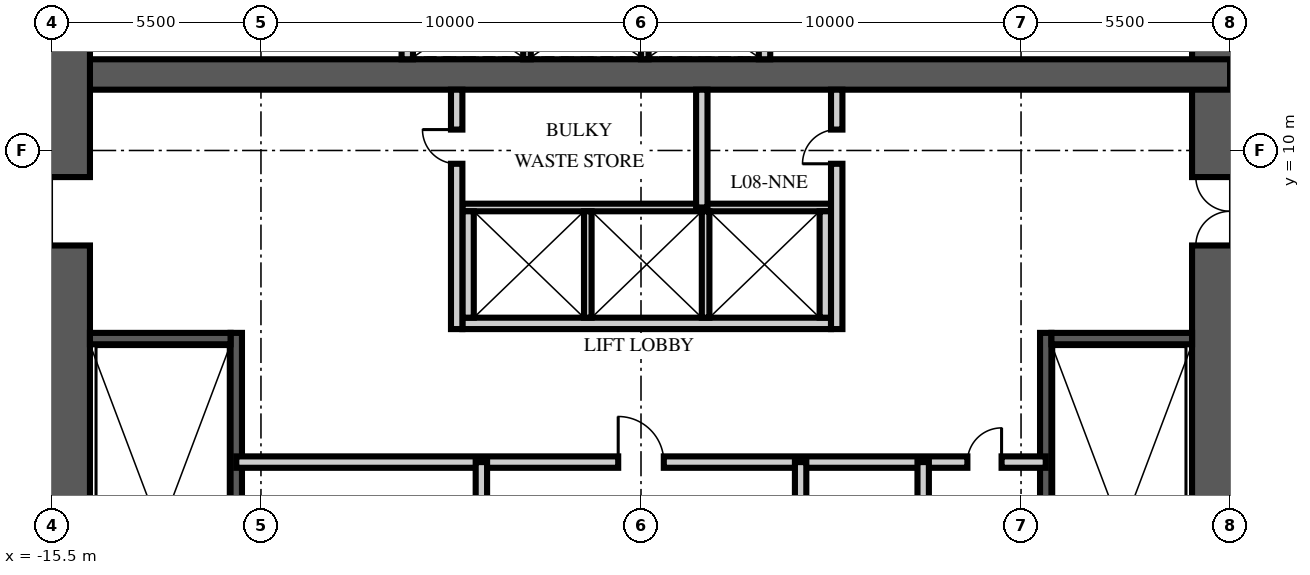
"""IFC4 building model, lengths in metres.
Left out: names, types, materials, properties, quantities, classifications, styles, units other than length and angle.
Written with IfcOpenShell. Run it as: python <this file> out.ifc"""

import sys

from ifc_helpers import new_model, si_unit, direction, frame, frame_2d, origin, place, context, subcontext, project, spatial, rectangle, extrude, element, fill, save


model = new_model("IFC4")
c1 = context("Model", 3, precision=1e-05, world=origin(), true_north=direction((0.0, 1.0)))
c2 = subcontext(c1, "Body", "Model", "MODEL_VIEW")
j1 = project(units=[si_unit("LENGTHUNIT", "METRE"), si_unit("PLANEANGLEUNIT", "RADIAN")], contexts=[c1])
p1 = place(None, origin())
s1 = spatial("IfcSite", under=j1, at=p1, CompositionType="ELEMENT")
p2 = place(p1, origin())
s2 = spatial("IfcBuilding", under=s1, at=p2, CompositionType="ELEMENT")
p3 = place(p2, frame((0.0, 0.0, 36.0)))
s3 = spatial("IfcBuildingStorey", under=s2, at=p3, CompositionType="ELEMENT", Elevation=36.0)
p4 = place(p3, frame((15.5, -15.5, -0.25), z_axis=(0.0, 0.0, 1.0), x_axis=(0.0, 1.0, 0.0)))
e1 = element("IfcWall", 1, at=p4, inside=s3, PredefinedType="SHEAR", context=c2, shape_type="SweptSolid", body=[
    extrude(rectangle(XDim=31.0, YDim=2.0, at=frame_2d((15.5, 0.0))), origin(), (0.0, 0.0, 1.0), 3.75),
])
p5 = place(p4, frame((6.5, 0.0, 0.25)))
e2 = element("IfcOpeningElement", 2, at=p5, cuts=e1, PredefinedType="OPENING", context=c2, shape_type="SweptSolid", body=[
    extrude(rectangle(XDim=1.2, YDim=2.1, at=frame_2d((0.6, 1.05))), frame((0.0, 1.01, 0.0), z_axis=(0.0, -1.0, 0.0), x_axis=(1.0, 0.0, 0.0)), (0.0, 0.0, 1.0), 2.02),
])
p6 = place(p4, frame((23.0, 0.0, 0.25)))
e3 = element("IfcOpeningElement", 3, at=p6, cuts=e1, PredefinedType="OPENING", context=c2, shape_type="SweptSolid", body=[
    extrude(rectangle(XDim=1.8, YDim=2.1, at=frame_2d((0.9, 1.05))), frame((0.0, 1.01, 0.0), z_axis=(0.0, -1.0, 0.0), x_axis=(1.0, 0.0, 0.0)), (0.0, 0.0, 1.0), 2.02),
])
p7 = place(p3, frame((-15.5, 12.0, -0.25), z_axis=(0.0, 0.0, 1.0), x_axis=(1.0, 0.0, 0.0)))
e4 = element("IfcWall", 4, at=p7, inside=s3, PredefinedType="SHEAR", context=c2, shape_type="SweptSolid", body=[
    extrude(rectangle(XDim=31.0, YDim=0.8, at=frame_2d((15.5, 0.0))), origin(), (0.0, 0.0, 1.0), 3.75),
])
p8 = place(p3, frame((-15.5, -15.5, -0.25), z_axis=(0.0, 0.0, 1.0), x_axis=(0.0, 1.0, 0.0)))
e5 = element("IfcWall", 5, at=p8, inside=s3, PredefinedType="SHEAR", context=c2, shape_type="SweptSolid", body=[
    extrude(rectangle(XDim=31.0, YDim=2.0, at=frame_2d((15.5, 0.0))), origin(), (0.0, 0.0, 1.0), 3.75),
])
p9 = place(p8, frame((6.5, 0.0, 0.25)))
e6 = element("IfcOpeningElement", 6, at=p9, cuts=e5, PredefinedType="OPENING", context=c2, shape_type="SweptSolid", body=[
    extrude(rectangle(XDim=1.2, YDim=2.1, at=frame_2d((0.6, 1.05))), frame((0.0, 1.01, 0.0), z_axis=(0.0, -1.0, 0.0), x_axis=(1.0, 0.0, 0.0)), (0.0, 0.0, 1.0), 2.02),
])
p10 = place(p8, frame((23.0, 0.0, 0.25)))
e7 = element("IfcOpeningElement", 7, at=p10, cuts=e5, PredefinedType="OPENING", context=c2, shape_type="SweptSolid", body=[
    extrude(rectangle(XDim=1.8, YDim=2.1, at=frame_2d((0.9, 1.05))), frame((0.0, 1.01, 0.0), z_axis=(0.0, -1.0, 0.0), x_axis=(1.0, 0.0, 0.0)), (0.0, 0.0, 1.0), 2.02),
])
p11 = place(p3, frame((-10.65, -4.9, 0.0), z_axis=(0.0, 0.0, 1.0), x_axis=(0.0, 1.0, 0.0)))
e8 = element("IfcWall", 8, at=p11, inside=s3, PredefinedType="SOLIDWALL", context=c2, shape_type="SweptSolid", body=[
    extrude(rectangle(XDim=10.1, YDim=0.3, at=frame_2d((5.05, 0.0))), origin(), (0.0, 0.0, 1.0), 3.5),
])
p12 = place(p3, frame((-14.5, 5.05, 0.0), z_axis=(0.0, 0.0, 1.0), x_axis=(1.0, 0.0, 0.0)))
e9 = element("IfcWall", 9, at=p12, inside=s3, PredefinedType="SOLIDWALL", context=c2, shape_type="SweptSolid", body=[
    extrude(rectangle(XDim=3.7, YDim=0.3, at=frame_2d((1.85, 0.0))), origin(), (0.0, 0.0, 1.0), 3.5),
])
p13 = place(p3, frame((10.65, -4.9, 0.0), z_axis=(0.0, 0.0, 1.0), x_axis=(0.0, 1.0, 0.0)))
e10 = element("IfcWall", 10, at=p13, inside=s3, PredefinedType="SOLIDWALL", context=c2, shape_type="SweptSolid", body=[
    extrude(rectangle(XDim=10.1, YDim=0.3, at=frame_2d((5.05, 0.0))), origin(), (0.0, 0.0, 1.0), 3.5),
])
p14 = place(p3, frame((14.5, 5.05, 0.0), z_axis=(0.0, 0.0, 1.0), x_axis=(-1.0, 0.0, 0.0)))
e11 = element("IfcWall", 11, at=p14, inside=s3, PredefinedType="SOLIDWALL", context=c2, shape_type="SweptSolid", body=[
    extrude(rectangle(XDim=3.7, YDim=0.3, at=frame_2d((1.85, 0.0))), origin(), (0.0, 0.0, 1.0), 3.5),
])
p15 = place(p3, frame((-4.7, 5.45, 0.0), z_axis=(0.0, 0.0, 1.0), x_axis=(1.0, 0.0, 0.0)))
e12 = element("IfcWall", 12, at=p15, inside=s3, PredefinedType="PARTITIONING", context=c2, shape_type="SweptSolid", body=[
    extrude(rectangle(XDim=9.7, YDim=0.3, at=frame_2d((4.85, 0.0))), origin(), (0.0, 0.0, 1.0), 3.5),
])
p16 = place(p3, frame((-4.7, 8.5, 0.0), z_axis=(0.0, 0.0, 1.0), x_axis=(1.0, 0.0, 0.0)))
e13 = element("IfcWall", 13, at=p16, inside=s3, PredefinedType="PARTITIONING", context=c2, shape_type="SweptSolid", body=[
    extrude(rectangle(XDim=9.7, YDim=0.2, at=frame_2d((4.85, 0.0))), origin(), (0.0, 0.0, 1.0), 3.5),
])
for number, where, z_axis, x_axis in (
    (14, (-4.55, 5.6, 0.0), (0.0, 0.0, 1.0), (0.0, 1.0, 0.0)),
    (15, (4.85, 5.6, 0.0), (0.0, 0.0, 1.0), (0.0, 1.0, 0.0)),
):
    element("IfcWall", number, at=place(p3, frame(where, z_axis=z_axis, x_axis=x_axis)), inside=s3, PredefinedType="PARTITIONING", context=c2, shape_type="SweptSolid", body=[
        extrude(rectangle(XDim=2.8, YDim=0.3, at=frame_2d((1.4, 0.0))), origin(), (0.0, 0.0, 1.0), 3.5),
    ])
for number, where, z_axis, x_axis in (
    (16, (-1.4, 5.6, 0.0), (0.0, 0.0, 1.0), (0.0, 1.0, 0.0)),
    (17, (1.7, 5.6, 0.0), (0.0, 0.0, 1.0), (0.0, 1.0, 0.0)),
):
    element("IfcWall", number, at=place(p3, frame(where, z_axis=z_axis, x_axis=x_axis)), inside=s3, PredefinedType="PARTITIONING", context=c2, shape_type="SweptSolid", body=[
        extrude(rectangle(XDim=2.8, YDim=0.2, at=frame_2d((1.4, 0.0))), origin(), (0.0, 0.0, 1.0), 3.5),
    ])
for number, where, z_axis, x_axis in (
    (18, (-6.15, 12.4, 0.0), (0.0, 0.0, 1.0), (0.0, 1.0, 0.0)),
    (19, (3.25, 12.4, 0.0), (0.0, 0.0, 1.0), (0.0, 1.0, 0.0)),
):
    element("IfcWall", number, at=place(p3, frame(where, z_axis=z_axis, x_axis=x_axis)), inside=s3, PredefinedType="PARTITIONING", context=c2, shape_type="SweptSolid", body=[
        extrude(rectangle(XDim=2.1, YDim=0.3, at=frame_2d((1.05, 0.0))), origin(), (0.0, 0.0, 1.0), 3.5),
    ])
for number, where, z_axis, x_axis in (
    (20, (-3.0, 12.4, 0.0), (0.0, 0.0, 1.0), (0.0, 1.0, 0.0)),
    (21, (0.1, 12.4, 0.0), (0.0, 0.0, 1.0), (0.0, 1.0, 0.0)),
):
    element("IfcWall", number, at=place(p3, frame(where, z_axis=z_axis, x_axis=x_axis)), inside=s3, PredefinedType="PARTITIONING", context=c2, shape_type="SweptSolid", body=[
        extrude(rectangle(XDim=2.1, YDim=0.2, at=frame_2d((1.05, 0.0))), origin(), (0.0, 0.0, 1.0), 3.5),
    ])
p17 = place(p3, frame((-10.65, 1.8, 0.0), z_axis=(0.0, 0.0, 1.0), x_axis=(1.0, 0.0, 0.0)))
e22 = element("IfcWall", 22, at=p17, inside=s3, PredefinedType="PARTITIONING", context=c2, shape_type="SweptSolid", body=[
    extrude(rectangle(XDim=21.3, YDim=0.3, at=frame_2d((10.65, 0.0))), origin(), (0.0, 0.0, 1.0), 3.5),
])
p18 = place(p17, frame((10.05, 0.0, 0.0)))
e23 = element("IfcOpeningElement", 23, at=p18, cuts=e22, PredefinedType="OPENING", context=c2, shape_type="SweptSolid", body=[
    extrude(rectangle(XDim=1.2, YDim=2.1, at=frame_2d((0.6, 1.05))), frame((0.0, 0.16, 0.0), z_axis=(0.0, -1.0, 0.0), x_axis=(1.0, 0.0, 0.0)), (0.0, 0.0, 1.0), 0.32),
])
p19 = place(p17, frame((19.238, 0.0, 0.0)))
e24 = element("IfcOpeningElement", 24, at=p19, cuts=e22, PredefinedType="OPENING", context=c2, shape_type="SweptSolid", body=[
    extrude(rectangle(XDim=0.9, YDim=2.1, at=frame_2d((0.45, 1.05))), frame((0.0, 0.16, 0.0), z_axis=(0.0, -1.0, 0.0), x_axis=(1.0, 0.0, 0.0)), (0.0, 0.0, 1.0), 0.32),
])
p20 = place(p3, frame((-4.2, -6.65, 0.0), z_axis=(0.0, 0.0, 1.0), x_axis=(0.0, 1.0, 0.0)))
e25 = element("IfcWall", 25, at=p20, inside=s3, PredefinedType="PARTITIONING", context=c2, shape_type="SweptSolid", body=[
    extrude(rectangle(XDim=8.45, YDim=0.3, at=frame_2d((4.225, 0.0))), origin(), (0.0, 0.0, 1.0), 3.5),
])
p21 = place(p20, frame((1.285, 0.0, 0.0)))
e26 = element("IfcOpeningElement", 26, at=p21, cuts=e25, PredefinedType="OPENING", context=c2, shape_type="SweptSolid", body=[
    extrude(rectangle(XDim=0.9, YDim=2.1, at=frame_2d((0.45, 1.05))), frame((0.0, 0.16, 0.0), z_axis=(0.0, -1.0, 0.0), x_axis=(1.0, 0.0, 0.0)), (0.0, 0.0, 1.0), 0.32),
])
p22 = place(p20, frame((5.51, 0.0, 0.0)))
e27 = element("IfcOpeningElement", 27, at=p22, cuts=e25, PredefinedType="OPENING", context=c2, shape_type="SweptSolid", body=[
    extrude(rectangle(XDim=0.9, YDim=2.1, at=frame_2d((0.45, 1.05))), frame((0.0, 0.16, 0.0), z_axis=(0.0, -1.0, 0.0), x_axis=(1.0, 0.0, 0.0)), (0.0, 0.0, 1.0), 0.32),
])
p23 = place(p3, frame((4.2, -6.65, 0.0), z_axis=(0.0, 0.0, 1.0), x_axis=(0.0, 1.0, 0.0)))
e28 = element("IfcWall", 28, at=p23, inside=s3, PredefinedType="PARTITIONING", context=c2, shape_type="SweptSolid", body=[
    extrude(rectangle(XDim=8.45, YDim=0.3, at=frame_2d((4.225, 0.0))), origin(), (0.0, 0.0, 1.0), 3.5),
])
p24 = place(p23, frame((1.451, 0.0, 0.0)))
e29 = element("IfcOpeningElement", 29, at=p24, cuts=e28, PredefinedType="OPENING", context=c2, shape_type="SweptSolid", body=[
    extrude(rectangle(XDim=0.9, YDim=2.1, at=frame_2d((0.45, 1.05))), frame((0.0, 0.16, 0.0), z_axis=(0.0, -1.0, 0.0), x_axis=(1.0, 0.0, 0.0)), (0.0, 0.0, 1.0), 0.32),
])
p25 = place(p23, frame((5.676, 0.0, 0.0)))
e30 = element("IfcOpeningElement", 30, at=p25, cuts=e28, PredefinedType="OPENING", context=c2, shape_type="SweptSolid", body=[
    extrude(rectangle(XDim=0.9, YDim=2.1, at=frame_2d((0.45, 1.05))), frame((0.0, 0.16, 0.0), z_axis=(0.0, -1.0, 0.0), x_axis=(1.0, 0.0, 0.0)), (0.0, 0.0, 1.0), 0.32),
])
p26 = place(p3, frame((7.425, -2.848, 0.0), z_axis=(0.0, 0.0, 1.0), x_axis=(0.0, 1.0, 0.0)))
e31 = element("IfcWall", 31, at=p26, inside=s3, PredefinedType="PARTITIONING", context=c2, shape_type="SweptSolid", body=[
    extrude(rectangle(XDim=4.648, YDim=0.3, at=frame_2d((2.324, 0.0))), origin(), (0.0, 0.0, 1.0), 3.5),
])
p27 = place(p3, frame((-4.85, 5.3, 0.0), z_axis=(0.0, 0.0, 1.0), x_axis=(0.0, 1.0, 0.0)))
e32 = element("IfcWall", 32, at=p27, inside=s3, PredefinedType="PARTITIONING", context=c2, shape_type="SweptSolid", body=[
    extrude(rectangle(XDim=6.3, YDim=0.3, at=frame_2d((3.15, 0.0))), origin(), (0.0, 0.0, 1.0), 3.5),
])
p28 = place(p27, frame((4.35, 0.0, 0.0)))
e33 = element("IfcOpeningElement", 33, at=p28, cuts=e32, PredefinedType="OPENING", context=c2, shape_type="SweptSolid", body=[
    extrude(rectangle(XDim=0.9, YDim=2.1, at=frame_2d((0.45, 1.05))), frame((0.0, 0.16, 0.0), z_axis=(0.0, -1.0, 0.0), x_axis=(1.0, 0.0, 0.0)), (0.0, 0.0, 1.0), 0.32),
])
p29 = place(p3, frame((5.15, 5.3, 0.0), z_axis=(0.0, 0.0, 1.0), x_axis=(0.0, 1.0, 0.0)))
e34 = element("IfcWall", 34, at=p29, inside=s3, PredefinedType="PARTITIONING", context=c2, shape_type="SweptSolid", body=[
    extrude(rectangle(XDim=6.3, YDim=0.3, at=frame_2d((3.15, 0.0))), origin(), (0.0, 0.0, 1.0), 3.5),
])
p30 = place(p29, frame((4.35, 0.0, 0.0)))
e35 = element("IfcOpeningElement", 35, at=p30, cuts=e34, PredefinedType="OPENING", context=c2, shape_type="SweptSolid", body=[
    extrude(rectangle(XDim=0.9, YDim=2.1, at=frame_2d((0.45, 1.05))), frame((0.0, 0.16, 0.0), z_axis=(0.0, -1.0, 0.0), x_axis=(1.0, 0.0, 0.0)), (0.0, 0.0, 1.0), 0.32),
])
p31 = place(p3, frame((1.6, 8.5, 0.0), z_axis=(0.0, 0.0, 1.0), x_axis=(0.0, 1.0, 0.0)))
e36 = element("IfcWall", 36, at=p31, inside=s3, PredefinedType="PARTITIONING", context=c2, shape_type="SweptSolid", body=[
    extrude(rectangle(XDim=3.1, YDim=0.3, at=frame_2d((1.55, 0.0))), origin(), (0.0, 0.0, 1.0), 3.5),
])
p32 = place(p10, origin())
e37 = element("IfcDoor", 37, at=p32, inside=s3, OperationType="DOUBLE_DOOR_SINGLE_SWING", PredefinedType="DOOR", context=c2, shape_type="SweptSolid", body=[
    extrude(rectangle(XDim=1.8, YDim=2.1, at=frame_2d((0.9, 1.05))), frame((0.0, 0.025, 0.0), z_axis=(0.0, -1.0, 0.0), x_axis=(1.0, 0.0, 0.0)), (0.0, 0.0, 1.0), 0.05),
])
fill(e7, e37)
p33 = place(p6, origin())
e38 = element("IfcDoor", 38, at=p33, inside=s3, OperationType="DOUBLE_DOOR_SINGLE_SWING", PredefinedType="DOOR", context=c2, shape_type="SweptSolid", body=[
    extrude(rectangle(XDim=1.8, YDim=2.1, at=frame_2d((0.9, 1.05))), frame((0.0, 0.025, 0.0), z_axis=(0.0, -1.0, 0.0), x_axis=(1.0, 0.0, 0.0)), (0.0, 0.0, 1.0), 0.05),
])
fill(e3, e38)
p34 = place(p18, origin())
e39 = element("IfcDoor", 39, at=p34, inside=s3, OperationType="SINGLE_SWING_LEFT", PredefinedType="DOOR", context=c2, shape_type="SweptSolid", body=[
    extrude(rectangle(XDim=1.2, YDim=2.1, at=frame_2d((0.6, 1.05))), frame((0.0, 0.025, 0.0), z_axis=(0.0, -1.0, 0.0), x_axis=(1.0, 0.0, 0.0)), (0.0, 0.0, 1.0), 0.05),
])
fill(e23, e39)
p35 = place(p19, origin())
e40 = element("IfcDoor", 40, at=p35, inside=s3, OperationType="SINGLE_SWING_RIGHT", PredefinedType="DOOR", context=c2, shape_type="SweptSolid", body=[
    extrude(rectangle(XDim=0.9, YDim=2.1, at=frame_2d((0.45, 1.05))), frame((0.0, 0.025, 0.0), z_axis=(0.0, -1.0, 0.0), x_axis=(1.0, 0.0, 0.0)), (0.0, 0.0, 1.0), 0.05),
])
fill(e24, e40)
p36 = place(p28, origin())
e41 = element("IfcDoor", 41, at=p36, inside=s3, OperationType="SINGLE_SWING_RIGHT", PredefinedType="DOOR", context=c2, shape_type="SweptSolid", body=[
    extrude(rectangle(XDim=0.9, YDim=2.1, at=frame_2d((0.45, 1.05))), frame((0.0, 0.025, 0.0), z_axis=(0.0, -1.0, 0.0), x_axis=(1.0, 0.0, 0.0)), (0.0, 0.0, 1.0), 0.05),
])
fill(e33, e41)
p37 = place(p30, origin())
e42 = element("IfcDoor", 42, at=p37, inside=s3, OperationType="SINGLE_SWING_LEFT", PredefinedType="DOOR", context=c2, shape_type="SweptSolid", body=[
    extrude(rectangle(XDim=0.9, YDim=2.1, at=frame_2d((0.45, 1.05))), frame((0.0, 0.025, 0.0), z_axis=(0.0, -1.0, 0.0), x_axis=(1.0, 0.0, 0.0)), (0.0, 0.0, 1.0), 0.05),
])
fill(e35, e42)
save(model, sys.argv[1])
